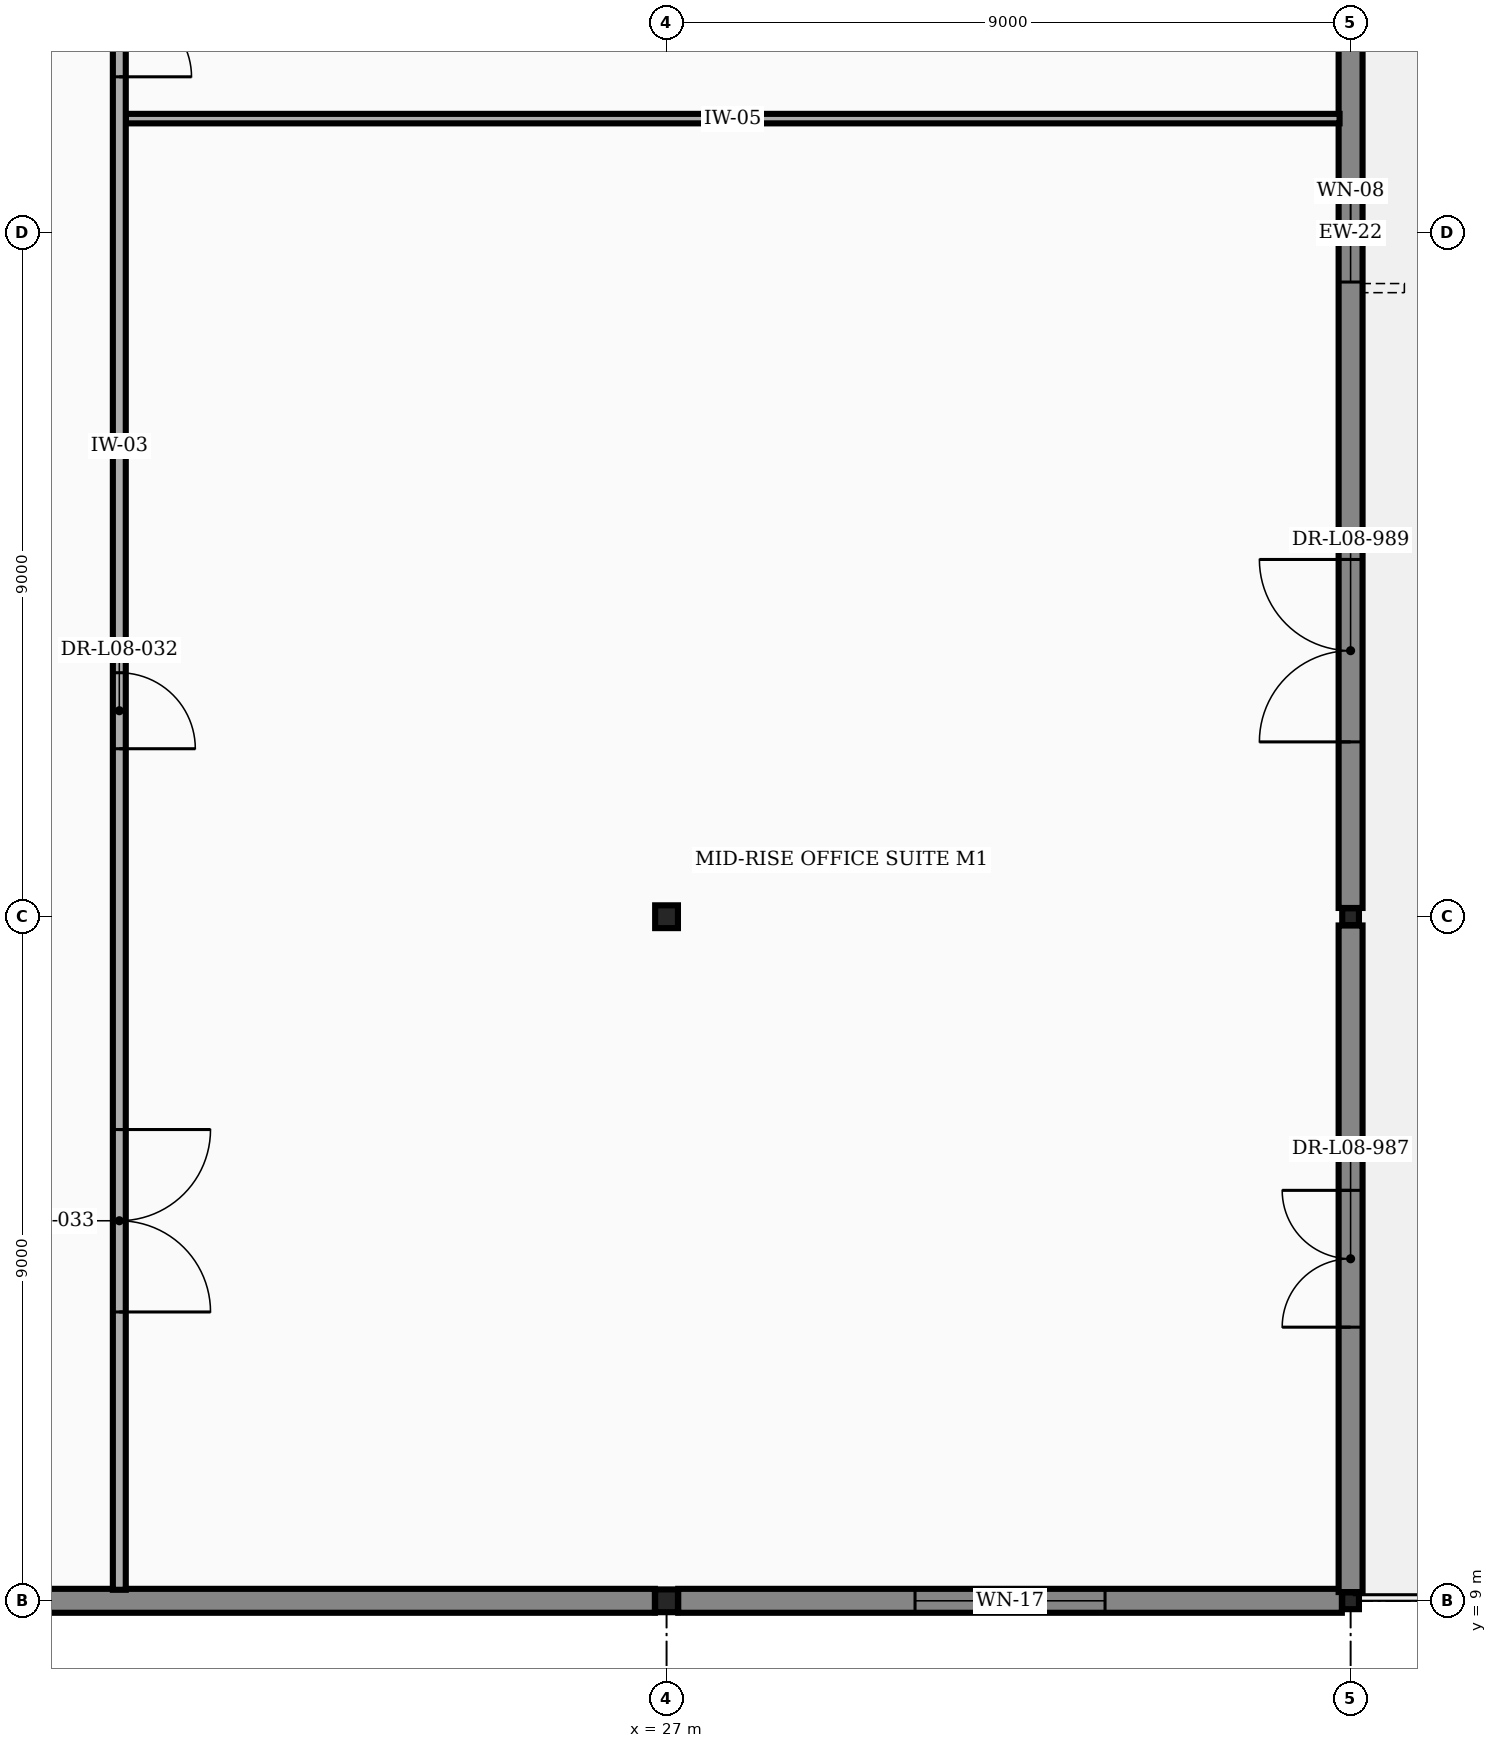
"""IFC4 building model, lengths in metres.
Left out: names, types, materials, properties, quantities, classifications, styles, units other than length and angle.
Written with IfcOpenShell. Run it as: python <this file> out.ifc"""

import sys

from ifc_helpers import new_model, si_unit, direction, frame, frame_2d, origin, origin_2d, place, context, subcontext, project, spatial, rectangle, hollow_rectangle, extrude, element, fill, save


model = new_model("IFC4")
c1 = context("Model", 3, precision=1e-05, world=origin(), true_north=direction((0.0, 1.0)))
c2 = subcontext(c1, "Body", "Model", "MODEL_VIEW")
j1 = project(units=[si_unit("LENGTHUNIT", "METRE"), si_unit("PLANEANGLEUNIT", "RADIAN")], contexts=[c1])
p1 = place(None, origin())
s1 = spatial("IfcSite", under=j1, at=p1, CompositionType="ELEMENT")
p2 = place(p1, origin())
s2 = spatial("IfcBuilding", under=s1, at=p2, CompositionType="ELEMENT")
p3 = place(p2, frame((0.0, 0.0, 37.8)))
s3 = spatial("IfcBuildingStorey", under=s2, at=p3, CompositionType="ELEMENT", Elevation=37.8)
for number, where, z_axis, x_axis in (
    (1, (27.0, 9.0, 0.0), (0.0, 0.0, 1.0), (1.0, 0.0, 0.0)),
    (2, (27.0, 18.0, 0.0), (0.0, 0.0, 1.0), (1.0, 0.0, 0.0)),
):
    element("IfcColumn", number, at=place(p3, frame(where, z_axis=z_axis, x_axis=x_axis)), inside=s3, PredefinedType="COLUMN", context=c2, shape_type="SweptSolid", body=[
        extrude(hollow_rectangle(XDim=0.3, YDim=0.3, WallThickness=0.012, at=origin_2d()), origin(), (0.0, 0.0, 1.0), 3.9),
    ])
for number, where, z_axis, x_axis in (
    (3, (36.0, 9.0, 0.0), (0.0, 0.0, 1.0), (1.0, 0.0, 0.0)),
    (4, (36.0, 18.0, 0.0), (0.0, 0.0, 1.0), (1.0, 0.0, 0.0)),
):
    element("IfcColumn", number, at=place(p3, frame(where, z_axis=z_axis, x_axis=x_axis)), inside=s3, PredefinedType="COLUMN", context=c2, shape_type="SweptSolid", body=[
        extrude(hollow_rectangle(XDim=0.22, YDim=0.22, WallThickness=0.01, at=origin_2d()), origin(), (0.0, 0.0, 1.0), 3.9),
    ])
p4 = place(p3, frame((9.154, 9.0, 0.0), z_axis=(0.0, 0.0, 1.0), x_axis=(1.0, 0.0, 0.0)))
e5 = element("IfcWall", 5, at=p4, inside=s3, PredefinedType="STANDARD", context=c2, shape_type="SweptSolid", body=[
    extrude(rectangle(XDim=17.692, YDim=0.315, at=frame_2d((8.846, 0.0))), origin(), (0.0, 0.0, 1.0), 2.803),
])
p5 = place(p4, frame((8.196, 0.0, 0.7)))
e6 = element("IfcOpeningElement", 6, at=p5, cuts=e5, PredefinedType="OPENING", context=c2, shape_type="SweptSolid", body=[
    extrude(rectangle(XDim=1.3, YDim=1.9, at=frame_2d((0.65, 0.95))), frame((0.0, 0.169, 0.0), z_axis=(0.0, -1.0, 0.0), x_axis=(1.0, 0.0, 0.0)), (0.0, 0.0, 1.0), 0.339),
])
p6 = place(p3, frame((27.154, 9.0, 0.0), z_axis=(0.0, 0.0, 1.0), x_axis=(1.0, 0.0, 0.0)))
e7 = element("IfcWall", 7, at=p6, inside=s3, PredefinedType="STANDARD", context=c2, shape_type="SweptSolid", body=[
    extrude(rectangle(XDim=8.731, YDim=0.315, at=frame_2d((4.366, 0.0))), origin(), (0.0, 0.0, 1.0), 3.565),
])
p7 = place(p6, frame((3.115, 0.0, 0.7)))
e8 = element("IfcOpeningElement", 8, at=p7, cuts=e7, PredefinedType="OPENING", context=c2, shape_type="SweptSolid", body=[
    extrude(rectangle(XDim=2.5, YDim=1.9, at=frame_2d((1.25, 0.95))), frame((0.0, 0.169, 0.0), z_axis=(0.0, -1.0, 0.0), x_axis=(1.0, 0.0, 0.0)), (0.0, 0.0, 1.0), 0.339),
])
p8 = place(p3, frame((36.0, 9.115, 0.0), z_axis=(0.0, 0.0, 1.0), x_axis=(0.0, 1.0, 0.0)))
e9 = element("IfcWall", 9, at=p8, inside=s3, PredefinedType="STANDARD", context=c2, shape_type="SweptSolid", body=[
    extrude(rectangle(XDim=8.77, YDim=0.315, at=frame_2d((4.385, 0.0))), origin(), (0.0, 0.0, 1.0), 3.565),
])
p9 = place(p8, frame((3.485, 0.0, 0.0)))
e10 = element("IfcOpeningElement", 10, at=p9, cuts=e9, PredefinedType="OPENING", context=c2, shape_type="SweptSolid", body=[
    extrude(rectangle(XDim=1.8, YDim=2.3, at=frame_2d((0.9, 1.15))), frame((0.0, 0.169, 0.0), z_axis=(0.0, -1.0, 0.0), x_axis=(1.0, 0.0, 0.0)), (0.0, 0.0, 1.0), 0.339),
])
p10 = place(p3, frame((36.0, 18.115, 0.0), z_axis=(0.0, 0.0, 1.0), x_axis=(0.0, 1.0, 0.0)))
e11 = element("IfcWall", 11, at=p10, inside=s3, PredefinedType="STANDARD", context=c2, shape_type="SweptSolid", body=[
    extrude(rectangle(XDim=17.77, YDim=0.315, at=frame_2d((8.885, 0.0))), origin(), (0.0, 0.0, 1.0), 2.953),
])
p11 = place(p10, frame((8.235, 0.0, 0.7)))
e12 = element("IfcOpeningElement", 12, at=p11, cuts=e11, PredefinedType="OPENING", context=c2, shape_type="SweptSolid", body=[
    extrude(rectangle(XDim=1.3, YDim=1.9, at=frame_2d((0.65, 0.95))), frame((0.0, 0.169, 0.0), z_axis=(0.0, -1.0, 0.0), x_axis=(1.0, 0.0, 0.0)), (0.0, 0.0, 1.0), 0.339),
])
p12 = place(p10, frame((2.185, 0.0, 0.0)))
e13 = element("IfcOpeningElement", 13, at=p12, cuts=e11, PredefinedType="OPENING", context=c2, shape_type="SweptSolid", body=[
    extrude(rectangle(XDim=2.4, YDim=2.35, at=frame_2d((1.2, 1.175))), frame((0.0, 0.169, 0.0), z_axis=(0.0, -1.0, 0.0), x_axis=(1.0, 0.0, 0.0)), (0.0, 0.0, 1.0), 0.339),
])
p13 = place(p3, frame((19.885, 28.5, 0.0), z_axis=(0.0, 0.0, 1.0), x_axis=(1.0, 0.0, 0.0)))
e14 = element("IfcWall", 14, at=p13, inside=s3, PredefinedType="PARTITIONING", context=c2, shape_type="SweptSolid", body=[
    extrude(rectangle(XDim=15.97, YDim=0.125, at=frame_2d((7.985, 0.0))), origin(), (0.0, 0.0, 1.0), 3.565),
])
p14 = place(p3, frame((19.8, 9.145, 0.0), z_axis=(0.0, 0.0, 1.0), x_axis=(0.0, 1.0, 0.0)))
e15 = element("IfcWall", 15, at=p14, inside=s3, PredefinedType="PARTITIONING", context=c2, shape_type="SweptSolid", body=[
    extrude(rectangle(XDim=30.095, YDim=0.17, at=frame_2d((15.047, 0.0))), origin(), (0.0, 0.0, 1.0), 3.565),
])
p15 = place(p14, frame((11.065, 0.0, 0.0)))
e16 = element("IfcOpeningElement", 16, at=p15, cuts=e15, PredefinedType="OPENING", context=c2, shape_type="SweptSolid", body=[
    extrude(rectangle(XDim=1.0, YDim=2.15, at=frame_2d((0.5, 1.075))), frame((0.0, 0.097, 0.0), z_axis=(0.0, -1.0, 0.0), x_axis=(1.0, 0.0, 0.0)), (0.0, 0.0, 1.0), 0.194),
])
p16 = place(p14, frame((3.655, 0.0, 0.0)))
e17 = element("IfcOpeningElement", 17, at=p16, cuts=e15, PredefinedType="OPENING", context=c2, shape_type="SweptSolid", body=[
    extrude(rectangle(XDim=2.4, YDim=2.35, at=frame_2d((1.2, 1.175))), frame((0.0, 0.097, 0.0), z_axis=(0.0, -1.0, 0.0), x_axis=(1.0, 0.0, 0.0)), (0.0, 0.0, 1.0), 0.194),
])
p17 = place(p14, frame((28.465, 0.0, 0.0)))
e18 = element("IfcOpeningElement", 18, at=p17, cuts=e15, PredefinedType="OPENING", context=c2, shape_type="SweptSolid", body=[
    extrude(rectangle(XDim=1.15, YDim=2.15, at=frame_2d((0.575, 1.075))), frame((0.0, 0.097, 0.0), z_axis=(0.0, -1.0, 0.0), x_axis=(1.0, 0.0, 0.0)), (0.0, 0.0, 1.0), 0.194),
])
p18 = place(p14, frame((19.905, 0.0, 0.0)))
e19 = element("IfcOpeningElement", 19, at=p18, cuts=e15, PredefinedType="OPENING", context=c2, shape_type="SweptSolid", body=[
    extrude(rectangle(XDim=1.9, YDim=2.35, at=frame_2d((0.95, 1.175))), frame((0.0, 0.097, 0.0), z_axis=(0.0, -1.0, 0.0), x_axis=(1.0, 0.0, 0.0)), (0.0, 0.0, 1.0), 0.194),
])
p19 = place(p7, origin())
e20 = element("IfcWindow", 20, at=p19, inside=s3, PartitioningType="SINGLE_PANEL", PredefinedType="WINDOW", context=c2, shape_type="SweptSolid", body=[
    extrude(rectangle(XDim=2.5, YDim=1.9, at=frame_2d((1.25, 0.95))), frame((0.0, 0.03, 0.0), z_axis=(0.0, -1.0, 0.0), x_axis=(1.0, 0.0, 0.0)), (0.0, 0.0, 1.0), 0.06),
])
fill(e8, e20)
p20 = place(p9, origin())
e21 = element("IfcDoor", 21, at=p20, inside=s3, OperationType="DOUBLE_DOOR_SINGLE_SWING", PredefinedType="DOOR", context=c2, shape_type="SweptSolid", body=[
    extrude(rectangle(XDim=1.8, YDim=2.3, at=frame_2d((0.9, 1.15))), frame((0.0, 0.025, 0.0), z_axis=(0.0, -1.0, 0.0), x_axis=(1.0, 0.0, 0.0)), (0.0, 0.0, 1.0), 0.05),
])
fill(e10, e21)
p21 = place(p11, origin())
e22 = element("IfcWindow", 22, at=p21, inside=s3, PartitioningType="SINGLE_PANEL", PredefinedType="WINDOW", context=c2, shape_type="SweptSolid", body=[
    extrude(rectangle(XDim=1.3, YDim=1.9, at=frame_2d((0.65, 0.95))), frame((0.0, 0.03, 0.0), z_axis=(0.0, -1.0, 0.0), x_axis=(1.0, 0.0, 0.0)), (0.0, 0.0, 1.0), 0.06),
])
fill(e12, e22)
p22 = place(p12, origin())
e23 = element("IfcDoor", 23, at=p22, inside=s3, OperationType="DOUBLE_DOOR_SINGLE_SWING", PredefinedType="DOOR", context=c2, shape_type="SweptSolid", body=[
    extrude(rectangle(XDim=2.4, YDim=2.35, at=frame_2d((1.2, 1.175))), frame((0.0, 0.025, 0.0), z_axis=(0.0, -1.0, 0.0), x_axis=(1.0, 0.0, 0.0)), (0.0, 0.0, 1.0), 0.05),
])
fill(e13, e23)
p23 = place(p15, frame((1.0, 0.0, 0.0), z_axis=(0.0, 0.0, 1.0), x_axis=(-1.0, 0.0, 0.0)))
e24 = element("IfcDoor", 24, at=p23, inside=s3, OperationType="SINGLE_SWING_RIGHT", PredefinedType="DOOR", context=c2, shape_type="SweptSolid", body=[
    extrude(rectangle(XDim=1.0, YDim=2.15, at=frame_2d((0.5, 1.075))), frame((0.0, 0.025, 0.0), z_axis=(0.0, -1.0, 0.0), x_axis=(1.0, 0.0, 0.0)), (0.0, 0.0, 1.0), 0.05),
])
fill(e16, e24)
p24 = place(p16, frame((2.4, 0.0, 0.0), z_axis=(0.0, 0.0, 1.0), x_axis=(-1.0, 0.0, 0.0)))
e25 = element("IfcDoor", 25, at=p24, inside=s3, OperationType="DOUBLE_DOOR_SINGLE_SWING", PredefinedType="DOOR", context=c2, shape_type="SweptSolid", body=[
    extrude(rectangle(XDim=2.4, YDim=2.35, at=frame_2d((1.2, 1.175))), frame((0.0, 0.025, 0.0), z_axis=(0.0, -1.0, 0.0), x_axis=(1.0, 0.0, 0.0)), (0.0, 0.0, 1.0), 0.05),
])
fill(e17, e25)
p25 = place(p18, frame((1.9, 0.0, 0.0), z_axis=(0.0, 0.0, 1.0), x_axis=(-1.0, 0.0, 0.0)))
e26 = element("IfcDoor", 26, at=p25, inside=s3, OperationType="DOUBLE_DOOR_SINGLE_SWING", PredefinedType="DOOR", context=c2, shape_type="SweptSolid", body=[
    extrude(rectangle(XDim=1.9, YDim=2.35, at=frame_2d((0.95, 1.175))), frame((0.0, 0.025, 0.0), z_axis=(0.0, -1.0, 0.0), x_axis=(1.0, 0.0, 0.0)), (0.0, 0.0, 1.0), 0.05),
])
fill(e19, e26)
save(model, sys.argv[1])
